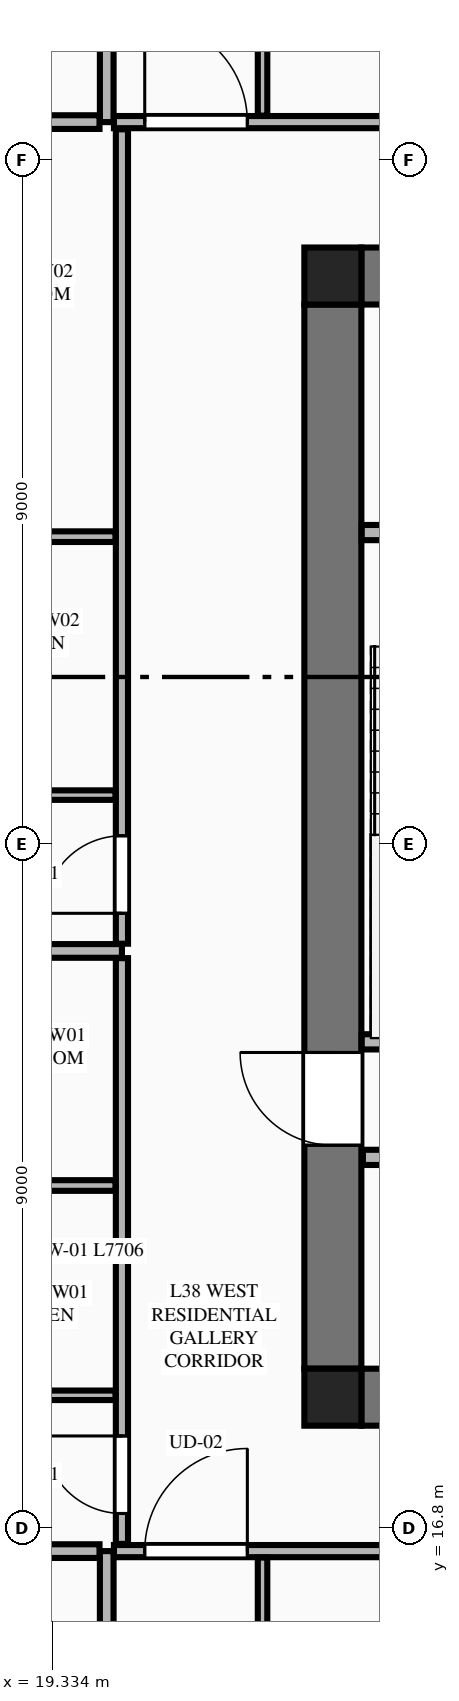
"""IFC4 building model, lengths in metres.
Left out: names, types, materials, properties, quantities, classifications, styles, units other than length and angle.
Written with IfcOpenShell. Run it as: python <this file> out.ifc"""

import sys

from ifc_helpers import new_model, si_unit, direction, frame, frame_2d, origin, origin_2d, place, context, subcontext, project, spatial, rectangle, extrude, element, fill, save


model = new_model("IFC4")
c1 = context("Model", 3, precision=1e-05, world=origin(), true_north=direction((0.0, 1.0)))
c2 = subcontext(c1, "Body", "Model", "MODEL_VIEW")
j1 = project(units=[si_unit("LENGTHUNIT", "METRE"), si_unit("PLANEANGLEUNIT", "RADIAN")], contexts=[c1])
p1 = place(None, origin())
s1 = spatial("IfcSite", under=j1, at=p1, CompositionType="ELEMENT")
p2 = place(p1, origin())
s2 = spatial("IfcBuilding", under=s1, at=p2, CompositionType="ELEMENT")
p3 = place(p2, frame((0.0, 0.0, 144.55)))
s3 = spatial("IfcBuildingStorey", under=s2, at=p3, CompositionType="ELEMENT", Elevation=144.55)
for number, where, z_axis, x_axis in (
    (1, (23.025, 18.525, 0.0), (0.0, 0.0, 1.0), (1.0, 0.0, 0.0)),
    (2, (23.025, 33.275, 0.0), (0.0, 0.0, 1.0), (1.0, 0.0, 0.0)),
):
    element("IfcColumn", number, at=place(p3, frame(where, z_axis=z_axis, x_axis=x_axis)), inside=s3, PredefinedType="COLUMN", context=c2, shape_type="SweptSolid", body=[
        extrude(rectangle(XDim=0.75, YDim=0.75, at=origin_2d()), origin(), (0.0, 0.0, 1.0), 3.55),
    ])
for number, where, z_axis, x_axis in (
    (3, (23.4, 18.525, 0.0), (0.0, 0.0, 1.0), (1.0, 0.0, 0.0)),
    (4, (23.4, 33.275, 0.0), (0.0, 0.0, 1.0), (1.0, 0.0, 0.0)),
):
    element("IfcWall", number, at=place(p3, frame(where, z_axis=z_axis, x_axis=x_axis)), inside=s3, PredefinedType="SHEAR", context=c2, shape_type="SweptSolid", body=[
        extrude(rectangle(XDim=18.0, YDim=0.75, at=frame_2d((9.0, 0.0))), origin(), (0.0, 0.0, 1.0), 3.27),
    ])
p4 = place(p3, frame((23.025, 18.9, 0.0), z_axis=(0.0, 0.0, 1.0), x_axis=(0.0, 1.0, 0.0)))
e5 = element("IfcWall", 5, at=p4, inside=s3, PredefinedType="SHEAR", context=c2, shape_type="SweptSolid", body=[
    extrude(rectangle(XDim=14.0, YDim=0.75, at=frame_2d((7.0, 0.0))), origin(), (0.0, 0.0, 1.0), 3.27),
])
p5 = place(p4, frame((2.94, 0.0, 0.0)))
e6 = element("IfcOpeningElement", 6, at=p5, cuts=e5, PredefinedType="OPENING", context=c2, shape_type="SweptSolid", body=[
    extrude(rectangle(XDim=1.22, YDim=2.25, at=frame_2d((0.61, 1.125))), frame((0.0, 0.385, 0.0), z_axis=(0.0, -1.0, 0.0), x_axis=(1.0, 0.0, 0.0)), (0.0, 0.0, 1.0), 0.77),
])
p6 = place(p3, frame((23.405, 23.2, 0.0), z_axis=(0.0, 0.0, 1.0), x_axis=(1.0, 0.0, 0.0)))
e7 = element("IfcWall", 7, at=p6, inside=s3, PredefinedType="PLUMBINGWALL", context=c2, shape_type="SweptSolid", body=[
    extrude(rectangle(XDim=3.27, YDim=0.2, at=frame_2d((1.635, 0.0))), origin(), (0.0, 0.0, 1.0), 3.27),
])
p7 = place(p3, frame((23.405, 29.9, 0.0), z_axis=(0.0, 0.0, 1.0), x_axis=(1.0, 0.0, 0.0)))
e8 = element("IfcWall", 8, at=p7, inside=s3, PredefinedType="PLUMBINGWALL", context=c2, shape_type="SweptSolid", body=[
    extrude(rectangle(XDim=3.27, YDim=0.2, at=frame_2d((1.635, 0.0))), origin(), (0.0, 0.0, 1.0), 3.27),
])
p8 = place(p7, frame((1.85, 0.0, 0.0)))
e9 = element("IfcOpeningElement", 9, at=p8, cuts=e8, PredefinedType="OPENING", context=c2, shape_type="SweptSolid", body=[
    extrude(rectangle(XDim=0.85, YDim=2.05, at=frame_2d((0.425, 1.025))), frame((0.0, 0.11, 0.0), z_axis=(0.0, -1.0, 0.0), x_axis=(1.0, 0.0, 0.0)), (0.0, 0.0, 1.0), 0.22),
])
p9 = place(p3, frame((23.42, 21.68, 0.0), z_axis=(0.0, 0.0, 1.0), x_axis=(1.0, 0.0, 0.0)))
e10 = element("IfcWall", 10, at=p9, inside=s3, PredefinedType="PLUMBINGWALL", context=c2, shape_type="SweptSolid", body=[
    extrude(rectangle(XDim=17.96, YDim=0.2, at=frame_2d((8.98, 0.0))), origin(), (0.0, 0.0, 1.0), 3.27),
])
p10 = place(p9, frame((11.6, 0.0, 0.0)))
e11 = element("IfcOpeningElement", 11, at=p10, cuts=e10, PredefinedType="OPENING", context=c2, shape_type="SweptSolid", body=[
    extrude(rectangle(XDim=1.1, YDim=2.2, at=frame_2d((0.55, 1.1))), frame((0.0, 0.11, 0.0), z_axis=(0.0, -1.0, 0.0), x_axis=(1.0, 0.0, 0.0)), (0.0, 0.0, 1.0), 0.22),
])
p11 = place(p9, frame((0.41, 0.0, 0.0)))
e12 = element("IfcOpeningElement", 12, at=p11, cuts=e10, PredefinedType="OPENING", context=c2, shape_type="SweptSolid", body=[
    extrude(rectangle(XDim=0.85, YDim=2.05, at=frame_2d((0.425, 1.025))), frame((0.0, 0.11, 0.0), z_axis=(0.0, -1.0, 0.0), x_axis=(1.0, 0.0, 0.0)), (0.0, 0.0, 1.0), 0.22),
])
p12 = place(p9, frame((13.78, 0.0, 0.0)))
e13 = element("IfcOpeningElement", 13, at=p12, cuts=e10, PredefinedType="OPENING", context=c2, shape_type="SweptSolid", body=[
    extrude(rectangle(XDim=0.85, YDim=2.05, at=frame_2d((0.425, 1.025))), frame((0.0, 0.11, 0.0), z_axis=(0.0, -1.0, 0.0), x_axis=(1.0, 0.0, 0.0)), (0.0, 0.0, 1.0), 0.22),
])
p13 = place(p9, frame((16.13, 0.0, 0.0)))
e14 = element("IfcOpeningElement", 14, at=p13, cuts=e10, PredefinedType="OPENING", context=c2, shape_type="SweptSolid", body=[
    extrude(rectangle(XDim=0.85, YDim=2.05, at=frame_2d((0.425, 1.025))), frame((0.0, 0.11, 0.0), z_axis=(0.0, -1.0, 0.0), x_axis=(1.0, 0.0, 0.0)), (0.0, 0.0, 1.0), 0.22),
])
p14 = place(p3, frame((20.05, 4.105, 0.0), z_axis=(0.0, 0.0, 1.0), x_axis=(0.0, 1.0, 0.0)))
e15 = element("IfcWall", 15, at=p14, inside=s3, PredefinedType="PARTITIONING", context=c2, shape_type="SweptSolid", body=[
    extrude(rectangle(XDim=12.395, YDim=0.18, at=frame_2d((6.198, 0.0))), origin(), (0.0, 0.0, 1.0), 3.27),
])
p15 = place(p3, frame((20.145, 16.5, 0.0), z_axis=(0.0, 0.0, 1.0), x_axis=(1.0, 0.0, 0.0)))
e16 = element("IfcWall", 16, at=p15, inside=s3, PredefinedType="PARTITIONING", context=c2, shape_type="SweptSolid", body=[
    extrude(rectangle(XDim=24.51, YDim=0.16, at=frame_2d((12.255, 0.0))), origin(), (0.0, 0.0, 1.0), 3.27),
])
p16 = place(p15, frame((0.405, 0.0, 0.0)))
e17 = element("IfcOpeningElement", 17, at=p16, cuts=e16, PredefinedType="OPENING", context=c2, shape_type="SweptSolid", body=[
    extrude(rectangle(XDim=1.35, YDim=2.35, at=frame_2d((0.675, 1.175))), frame((0.0, 0.09, 0.0), z_axis=(0.0, -1.0, 0.0), x_axis=(1.0, 0.0, 0.0)), (0.0, 0.0, 1.0), 0.18),
])
p17 = place(p3, frame((22.1, 12.267, 0.0), z_axis=(0.0, 0.0, 1.0), x_axis=(0.0, 1.0, 0.0)))
e18 = element("IfcWall", 18, at=p17, inside=s3, PredefinedType="PARTITIONING", context=c2, shape_type="SweptSolid", body=[
    extrude(rectangle(XDim=4.148, YDim=0.125, at=frame_2d((2.074, 0.0))), origin(), (0.0, 0.0, 1.0), 2.652),
])
p18 = place(p3, frame((20.05, 35.3, 0.0), z_axis=(0.0, 0.0, 1.0), x_axis=(0.0, 1.0, 0.0)))
e19 = element("IfcWall", 19, at=p18, inside=s3, PredefinedType="PARTITIONING", context=c2, shape_type="SweptSolid", body=[
    extrude(rectangle(XDim=12.195, YDim=0.18, at=frame_2d((6.098, 0.0))), origin(), (0.0, 0.0, 1.0), 3.27),
])
p19 = place(p3, frame((20.145, 35.3, 0.0), z_axis=(0.0, 0.0, 1.0), x_axis=(1.0, 0.0, 0.0)))
e20 = element("IfcWall", 20, at=p19, inside=s3, PredefinedType="PARTITIONING", context=c2, shape_type="SweptSolid", body=[
    extrude(rectangle(XDim=24.51, YDim=0.16, at=frame_2d((12.255, 0.0))), origin(), (0.0, 0.0, 1.0), 3.27),
])
p20 = place(p19, frame((0.405, 0.0, 0.0)))
e21 = element("IfcOpeningElement", 21, at=p20, cuts=e20, PredefinedType="OPENING", context=c2, shape_type="SweptSolid", body=[
    extrude(rectangle(XDim=1.35, YDim=2.35, at=frame_2d((0.675, 1.175))), frame((0.0, 0.09, 0.0), z_axis=(0.0, -1.0, 0.0), x_axis=(1.0, 0.0, 0.0)), (0.0, 0.0, 1.0), 0.18),
])
p21 = place(p3, frame((22.1, 35.385, 0.0), z_axis=(0.0, 0.0, 1.0), x_axis=(0.0, 1.0, 0.0)))
e22 = element("IfcWall", 22, at=p21, inside=s3, PredefinedType="PARTITIONING", context=c2, shape_type="SweptSolid", body=[
    extrude(rectangle(XDim=6.151, YDim=0.125, at=frame_2d((3.075, 0.0))), origin(), (0.0, 0.0, 1.0), 2.652),
])
p22 = place(p3, frame((12.185, 16.5, 0.0), z_axis=(0.0, 0.0, 1.0), x_axis=(1.0, 0.0, 0.0)))
e23 = element("IfcWall", 23, at=p22, inside=s3, PredefinedType="PARTITIONING", context=c2, shape_type="SweptSolid", body=[
    extrude(rectangle(XDim=7.77, YDim=0.18, at=frame_2d((3.885, 0.0))), origin(), (0.0, 0.0, 1.0), 3.27),
])
p23 = place(p3, frame((12.286, 35.3, 0.0), z_axis=(0.0, 0.0, 1.0), x_axis=(1.0, 0.0, 0.0)))
e24 = element("IfcWall", 24, at=p23, inside=s3, PredefinedType="PARTITIONING", context=c2, shape_type="SweptSolid", body=[
    extrude(rectangle(XDim=7.669, YDim=0.18, at=frame_2d((3.834, 0.0))), origin(), (0.0, 0.0, 1.0), 3.27),
])
p24 = place(p3, frame((20.25, 16.595, 0.0), z_axis=(0.0, 0.0, 1.0), x_axis=(0.0, 1.0, 0.0)))
e25 = element("IfcWall", 25, at=p24, inside=s3, PredefinedType="PARTITIONING", context=c2, shape_type="SweptSolid", body=[
    extrude(rectangle(XDim=7.706, YDim=0.16, at=frame_2d((3.853, 0.0))), origin(), (0.0, 0.0, 1.0), 3.27),
])
p25 = place(p24, frame((0.4, 0.0, 0.0)))
e26 = element("IfcOpeningElement", 26, at=p25, cuts=e25, PredefinedType="OPENING", context=c2, shape_type="SweptSolid", body=[
    extrude(rectangle(XDim=1.02, YDim=2.25, at=frame_2d((0.51, 1.125))), frame((0.0, 0.09, 0.0), z_axis=(0.0, -1.0, 0.0), x_axis=(1.0, 0.0, 0.0)), (0.0, 0.0, 1.0), 0.18),
])
p26 = place(p3, frame((17.585, 18.55, 0.0), z_axis=(0.0, 0.0, 1.0), x_axis=(1.0, 0.0, 0.0)))
e27 = element("IfcWall", 27, at=p26, inside=s3, PredefinedType="PARTITIONING", context=c2, shape_type="SweptSolid", body=[
    extrude(rectangle(XDim=2.58, YDim=0.125, at=frame_2d((1.29, 0.0))), origin(), (0.0, 0.0, 1.0), 2.652),
])
p27 = place(p3, frame((17.585, 21.31, 0.0), z_axis=(0.0, 0.0, 1.0), x_axis=(1.0, 0.0, 0.0)))
e28 = element("IfcWall", 28, at=p27, inside=s3, PredefinedType="PLUMBINGWALL", context=c2, shape_type="SweptSolid", body=[
    extrude(rectangle(XDim=2.58, YDim=0.14, at=frame_2d((1.29, 0.0))), origin(), (0.0, 0.0, 1.0), 3.27),
])
p28 = place(p3, frame((8.19, 24.396, 0.0), z_axis=(0.0, 0.0, 1.0), x_axis=(1.0, 0.0, 0.0)))
e29 = element("IfcWall", 29, at=p28, inside=s3, PredefinedType="PARTITIONING", context=c2, shape_type="SweptSolid", body=[
    extrude(rectangle(XDim=12.06, YDim=0.18, at=frame_2d((6.03, 0.0))), origin(), (0.0, 0.0, 1.0), 3.27),
])
p29 = place(p3, frame((20.25, 24.491, 0.0), z_axis=(0.0, 0.0, 1.0), x_axis=(0.0, 1.0, 0.0)))
e30 = element("IfcWall", 30, at=p29, inside=s3, PredefinedType="PARTITIONING", context=c2, shape_type="SweptSolid", body=[
    extrude(rectangle(XDim=10.714, YDim=0.16, at=frame_2d((5.357, 0.0))), origin(), (0.0, 0.0, 1.0), 3.27),
])
p30 = place(p29, frame((0.4, 0.0, 0.0)))
e31 = element("IfcOpeningElement", 31, at=p30, cuts=e30, PredefinedType="OPENING", context=c2, shape_type="SweptSolid", body=[
    extrude(rectangle(XDim=1.02, YDim=2.25, at=frame_2d((0.51, 1.125))), frame((0.0, 0.09, 0.0), z_axis=(0.0, -1.0, 0.0), x_axis=(1.0, 0.0, 0.0)), (0.0, 0.0, 1.0), 0.18),
])
p31 = place(p3, frame((17.585, 26.446, 0.0), z_axis=(0.0, 0.0, 1.0), x_axis=(1.0, 0.0, 0.0)))
e32 = element("IfcWall", 32, at=p31, inside=s3, PredefinedType="PARTITIONING", context=c2, shape_type="SweptSolid", body=[
    extrude(rectangle(XDim=2.58, YDim=0.125, at=frame_2d((1.29, 0.0))), origin(), (0.0, 0.0, 1.0), 3.27),
])
p32 = place(p3, frame((17.585, 29.846, 0.0), z_axis=(0.0, 0.0, 1.0), x_axis=(1.0, 0.0, 0.0)))
e33 = element("IfcWall", 33, at=p32, inside=s3, PredefinedType="PLUMBINGWALL", context=c2, shape_type="SweptSolid", body=[
    extrude(rectangle(XDim=2.58, YDim=0.14, at=frame_2d((1.29, 0.0))), origin(), (0.0, 0.0, 1.0), 3.27),
])
p33 = place(p5, origin())
e34 = element("IfcDoor", 34, at=p33, inside=s3, OperationType="SINGLE_SWING_RIGHT", PredefinedType="DOOR", context=c2, shape_type="SweptSolid", body=[
    extrude(rectangle(XDim=1.22, YDim=2.25, at=frame_2d((0.61, 1.125))), frame((0.0, 0.025, 0.0), z_axis=(0.0, -1.0, 0.0), x_axis=(1.0, 0.0, 0.0)), (0.0, 0.0, 1.0), 0.05),
])
fill(e6, e34)
p34 = place(p16, origin())
e35 = element("IfcDoor", 35, at=p34, inside=s3, OperationType="SINGLE_SWING_RIGHT", PredefinedType="DOOR", context=c2, shape_type="SweptSolid", body=[
    extrude(rectangle(XDim=1.35, YDim=2.35, at=frame_2d((0.675, 1.175))), frame((0.0, 0.025, 0.0), z_axis=(0.0, -1.0, 0.0), x_axis=(1.0, 0.0, 0.0)), (0.0, 0.0, 1.0), 0.05),
])
fill(e17, e35)
p35 = place(p20, origin())
e36 = element("IfcDoor", 36, at=p35, inside=s3, OperationType="SINGLE_SWING_LEFT", PredefinedType="DOOR", context=c2, shape_type="SweptSolid", body=[
    extrude(rectangle(XDim=1.35, YDim=2.35, at=frame_2d((0.675, 1.175))), frame((0.0, 0.025, 0.0), z_axis=(0.0, -1.0, 0.0), x_axis=(1.0, 0.0, 0.0)), (0.0, 0.0, 1.0), 0.05),
])
fill(e21, e36)
p36 = place(p25, origin())
e37 = element("IfcDoor", 37, at=p36, inside=s3, OperationType="SINGLE_SWING_RIGHT", PredefinedType="DOOR", context=c2, shape_type="SweptSolid", body=[
    extrude(rectangle(XDim=1.02, YDim=2.25, at=frame_2d((0.51, 1.125))), frame((0.0, 0.025, 0.0), z_axis=(0.0, -1.0, 0.0), x_axis=(1.0, 0.0, 0.0)), (0.0, 0.0, 1.0), 0.05),
])
fill(e26, e37)
p37 = place(p30, origin())
e38 = element("IfcDoor", 38, at=p37, inside=s3, OperationType="SINGLE_SWING_LEFT", PredefinedType="DOOR", context=c2, shape_type="SweptSolid", body=[
    extrude(rectangle(XDim=1.02, YDim=2.25, at=frame_2d((0.51, 1.125))), frame((0.0, 0.025, 0.0), z_axis=(0.0, -1.0, 0.0), x_axis=(1.0, 0.0, 0.0)), (0.0, 0.0, 1.0), 0.05),
])
fill(e31, e38)
save(model, sys.argv[1])
